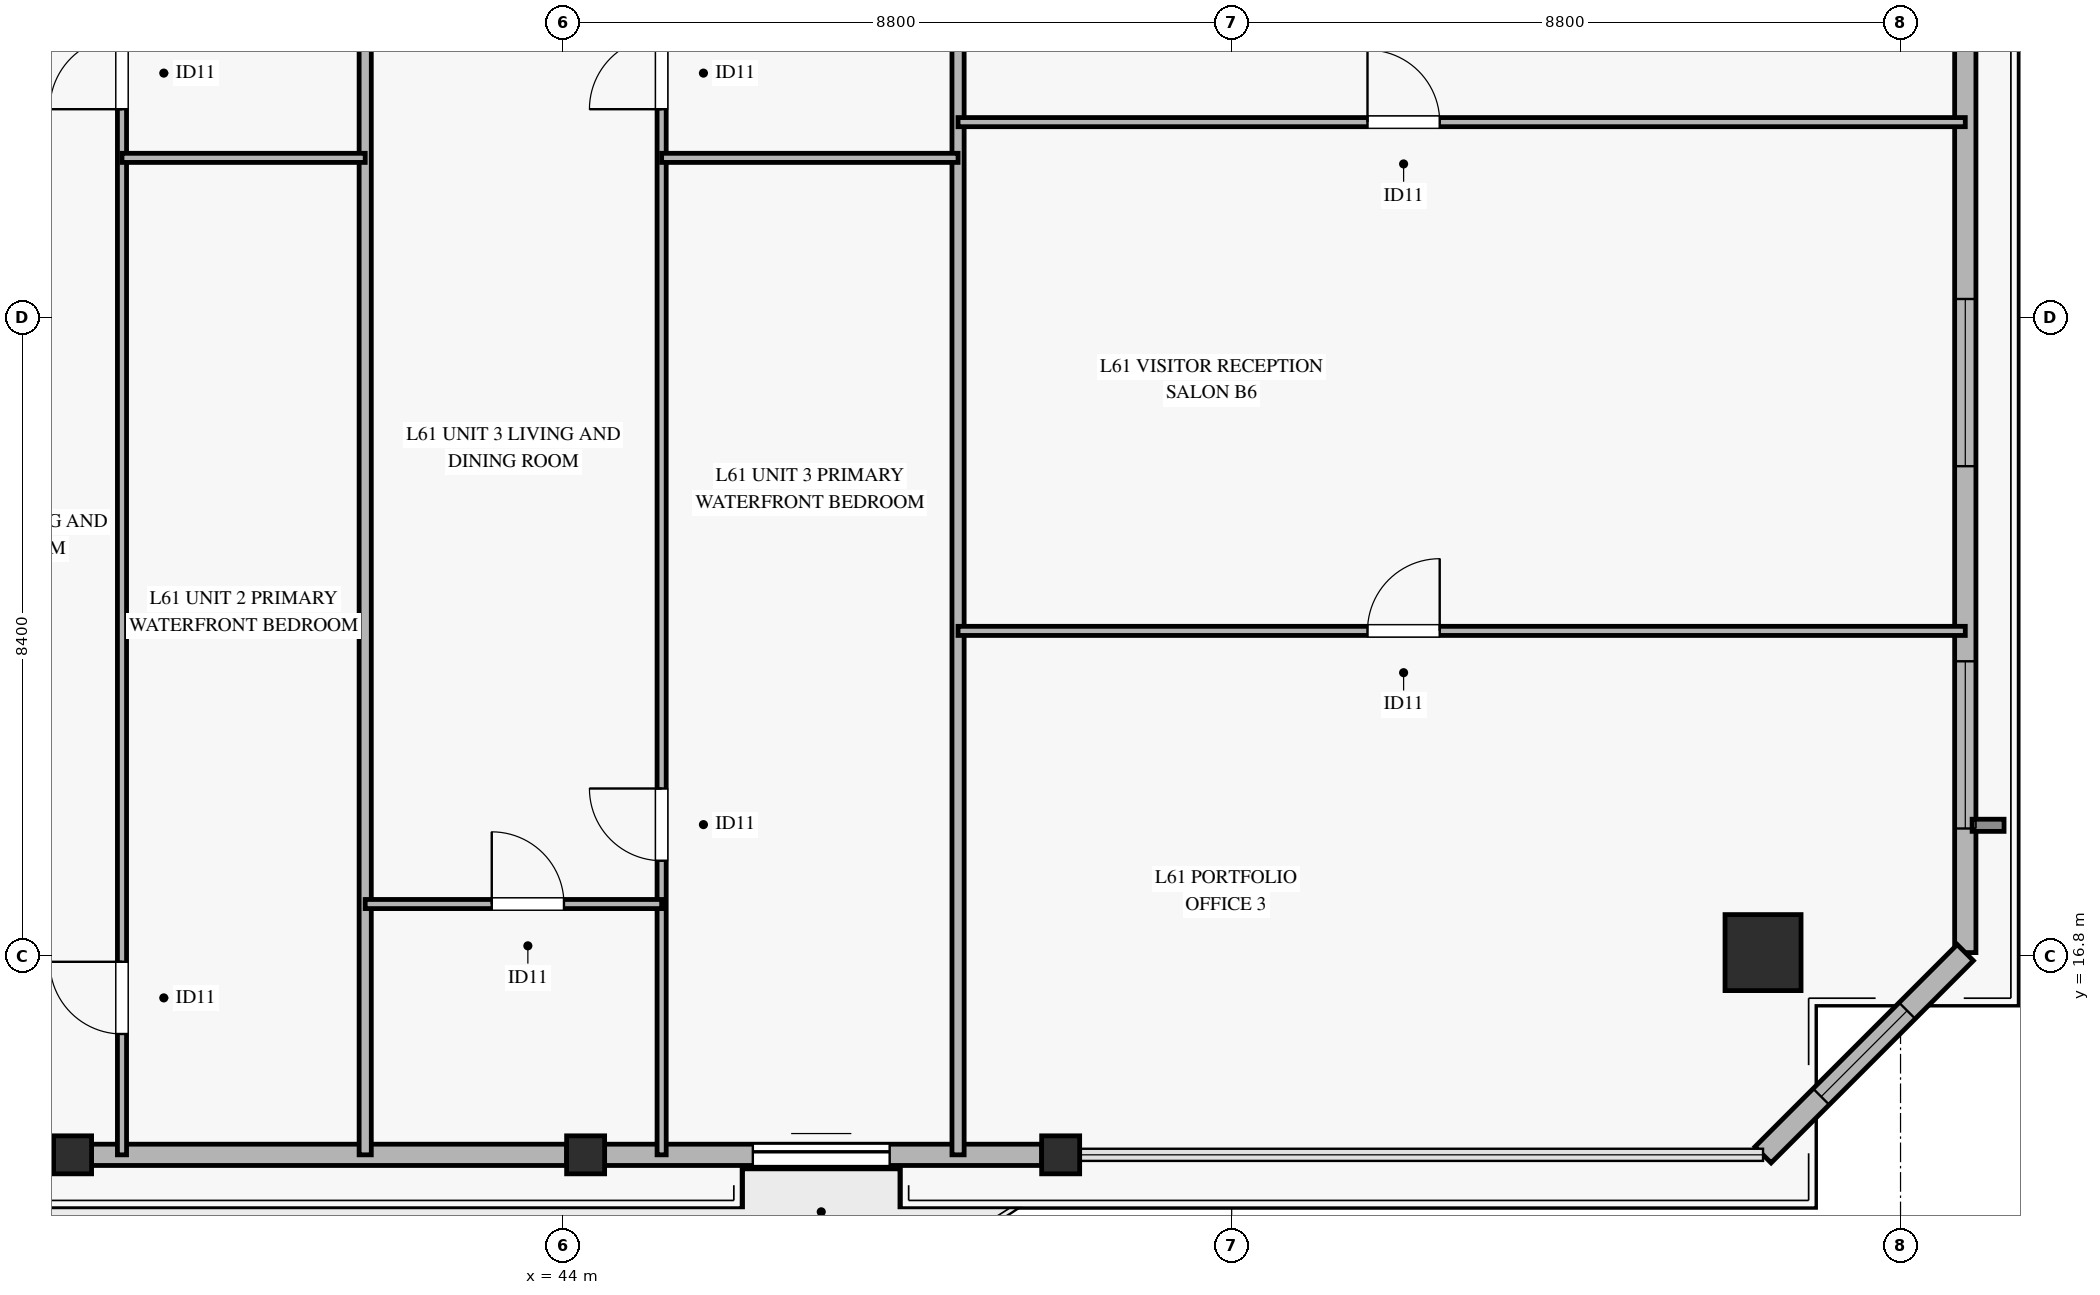
"""IFC4 building model, lengths in metres.
Left out: names, types, materials, properties, quantities, classifications, styles, units other than length and angle.
Written with IfcOpenShell. Run it as: python <this file> out.ifc"""

import sys

from ifc_helpers import new_model, si_unit, direction, frame, frame_2d, origin, origin_2d, place, context, subcontext, project, spatial, rectangle, hollow_rectangle, extrude, source, transform, mapped, element, fill, save


model = new_model("IFC4")
c1 = context("Model", 3, precision=1e-05, world=origin(), true_north=direction((0.0, 1.0)))
c2 = subcontext(c1, "Body", "Model", "MODEL_VIEW")
j1 = project(units=[si_unit("LENGTHUNIT", "METRE"), si_unit("PLANEANGLEUNIT", "RADIAN")], contexts=[c1])
p1 = place(None, origin())
s1 = spatial("IfcSite", under=j1, at=p1, CompositionType="ELEMENT")
p2 = place(p1, origin())
s2 = spatial("IfcBuilding", under=s1, at=p2, CompositionType="ELEMENT")
p3 = place(p2, frame((0.0, 0.0, 241.7)))
s3 = spatial("IfcBuildingStorey", under=s2, at=p3, CompositionType="ELEMENT", Elevation=241.7)
m1 = source(origin(), c2, "Body", "SweptSolid", [
    extrude(hollow_rectangle(XDim=1.0, YDim=1.0, WallThickness=0.045, at=origin_2d()), origin(), (0.0, 0.0, 1.0), 3.185),
])
p4 = place(p3, frame((59.791, 16.843, 0.0), z_axis=(0.0, 0.0, 1.0), x_axis=(1.0, 0.0, 0.0)))
e1 = element("IfcColumn", 1, at=p4, inside=s3, PredefinedType="COLUMN", context=c2, shape_type="MappedRepresentation", body=[
    mapped(m1, transform((0.0, 0.0, 0.0), x_axis=(1.0, 0.0, 0.0), y_axis=(0.0, 1.0, 0.0), z_axis=(0.0, 0.0, 1.0), scale=1.0)),
])
m2 = source(origin(), c2, "Body", "SweptSolid", [
    extrude(hollow_rectangle(XDim=0.5, YDim=0.5, WallThickness=0.024, at=origin_2d()), origin(), (0.0, 0.0, 1.0), 3.185),
])
for number, where, z_axis, x_axis in (
    (2, (37.55, 14.182, 0.0), (0.0, 0.0, 1.0), (1.0, 0.0, 0.0)),
    (3, (44.3, 14.182, 0.0), (0.0, 0.0, 1.0), (1.0, 0.0, 0.0)),
    (4, (50.55, 14.182, 0.0), (0.0, 0.0, 1.0), (1.0, 0.0, 0.0)),
):
    element("IfcColumn", number, at=place(p3, frame(where, z_axis=z_axis, x_axis=x_axis)), inside=s3, PredefinedType="COLUMN", context=c2, shape_type="MappedRepresentation", body=[
        mapped(m2, transform((0.0, 0.0, 0.0), x_axis=(1.0, 0.0, 0.0), y_axis=(0.0, 1.0, 0.0), z_axis=(0.0, 0.0, 1.0), scale=1.0)),
    ])
for number, where, z_axis, x_axis in (
    (5, (31.05, 14.182, 0.0), (0.0, 0.0, 1.0), (1.0, 0.0, 0.0)),
    (6, (37.8, 14.182, 0.0), (0.0, 0.0, 1.0), (1.0, 0.0, 0.0)),
):
    element("IfcWall", number, at=place(p3, frame(where, z_axis=z_axis, x_axis=x_axis)), inside=s3, PredefinedType="SOLIDWALL", context=c2, shape_type="SweptSolid", body=[
        extrude(rectangle(XDim=6.25, YDim=0.28, at=frame_2d((3.125, 0.0))), origin(), (0.0, 0.0, 1.0), 2.815),
    ])
p5 = place(p3, frame((44.55, 14.182, 0.0), z_axis=(0.0, 0.0, 1.0), x_axis=(1.0, 0.0, 0.0)))
e7 = element("IfcWall", 7, at=p5, inside=s3, PredefinedType="SOLIDWALL", context=c2, shape_type="SweptSolid", body=[
    extrude(rectangle(XDim=5.75, YDim=0.28, at=frame_2d((2.875, 0.0))), origin(), (0.0, 0.0, 1.0), 2.815),
])
p6 = place(p5, frame((1.95, 0.0, 0.0)))
e8 = element("IfcOpeningElement", 8, at=p6, cuts=e7, PredefinedType="OPENING", context=c2, shape_type="SweptSolid", body=[
    extrude(rectangle(XDim=1.8, YDim=2.25, at=frame_2d((0.9, 1.125))), frame((0.0, 0.15, 0.0), z_axis=(0.0, -1.0, 0.0), x_axis=(1.0, 0.0, 0.0)), (0.0, 0.0, 1.0), 0.3),
])
p7 = place(p3, frame((62.452, 16.843, 0.0), z_axis=(0.0, 0.0, 1.0), x_axis=(0.0, 1.0, 0.0)))
e9 = element("IfcWall", 9, at=p7, inside=s3, PredefinedType="SOLIDWALL", context=c2, shape_type="SweptSolid", body=[
    extrude(rectangle(XDim=13.048, YDim=0.28, at=frame_2d((6.524, 0.0))), origin(), (0.0, 0.0, 1.0), 2.815),
])
p8 = place(p7, frame((1.633, 0.0, 0.45)))
e10 = element("IfcOpeningElement", 10, at=p8, cuts=e9, PredefinedType="OPENING", context=c2, shape_type="SweptSolid", body=[
    extrude(rectangle(XDim=2.2, YDim=2.1, at=frame_2d((1.1, 1.05))), frame((0.0, 0.15, 0.0), z_axis=(0.0, -1.0, 0.0), x_axis=(1.0, 0.0, 0.0)), (0.0, 0.0, 1.0), 0.3),
])
p9 = place(p7, frame((6.4, 0.0, 0.45)))
e11 = element("IfcOpeningElement", 11, at=p9, cuts=e9, PredefinedType="OPENING", context=c2, shape_type="SweptSolid", body=[
    extrude(rectangle(XDim=2.2, YDim=2.1, at=frame_2d((1.1, 1.05))), frame((0.0, 0.15, 0.0), z_axis=(0.0, -1.0, 0.0), x_axis=(1.0, 0.0, 0.0)), (0.0, 0.0, 1.0), 0.3),
])
p10 = place(p3, frame((59.791, 14.182, 0.0), z_axis=(0.0, 0.0, 1.0), x_axis=(0.707074342864, 0.707139218021, 0.0)))
e12 = element("IfcWall", 12, at=p10, inside=s3, PredefinedType="SOLIDWALL", context=c2, shape_type="SweptSolid", body=[
    extrude(rectangle(XDim=3.763, YDim=0.3, at=frame_2d((1.882, 0.0))), origin(), (0.0, 0.0, 1.0), 2.815),
])
p11 = place(p10, frame((1.082, 0.0, 0.45)))
e13 = element("IfcOpeningElement", 13, at=p11, cuts=e12, PredefinedType="OPENING", context=c2, shape_type="SweptSolid", body=[
    extrude(rectangle(XDim=1.6, YDim=2.0, at=frame_2d((0.8, 1.0))), frame((0.0, 0.16, 0.0), z_axis=(0.0, -1.0, 0.0), x_axis=(1.0, 0.0, 0.0)), (0.0, 0.0, 1.0), 0.32),
])
for number, where, z_axis, x_axis in (
    (14, (41.4, 14.182, 0.0), (0.0, 0.0, 1.0), (0.0, 1.0, 0.0)),
    (15, (49.2, 14.182, 0.0), (0.0, 0.0, 1.0), (0.0, 1.0, 0.0)),
):
    element("IfcWall", number, at=place(p3, frame(where, z_axis=z_axis, x_axis=x_axis)), inside=s3, PredefinedType="PARTITIONING", context=c2, shape_type="SweptSolid", body=[
        extrude(rectangle(XDim=19.968, YDim=0.16, at=frame_2d((9.984, 0.0))), origin(), (0.0, 0.0, 1.0), 2.77),
    ])
p12 = place(p3, frame((38.2, 14.182, 0.0), z_axis=(0.0, 0.0, 1.0), x_axis=(0.0, 1.0, 0.0)))
e16 = element("IfcWall", 16, at=p12, inside=s3, PredefinedType="PARTITIONING", context=c2, shape_type="SweptSolid", body=[
    extrude(rectangle(XDim=17.318, YDim=0.12, at=frame_2d((8.659, 0.0))), origin(), (0.0, 0.0, 1.0), 2.77),
])
p13 = place(p12, frame((1.59, 0.0, 0.0)))
e17 = element("IfcOpeningElement", 17, at=p13, cuts=e16, PredefinedType="OPENING", context=c2, shape_type="SweptSolid", body=[
    extrude(rectangle(XDim=0.95, YDim=2.1, at=frame_2d((0.475, 1.05))), frame((0.0, 0.07, 0.0), z_axis=(0.0, -1.0, 0.0), x_axis=(1.0, 0.0, 0.0)), (0.0, 0.0, 1.0), 0.14),
])
p14 = place(p12, frame((13.758, 0.0, 0.0)))
e18 = element("IfcOpeningElement", 18, at=p14, cuts=e16, PredefinedType="OPENING", context=c2, shape_type="SweptSolid", body=[
    extrude(rectangle(XDim=0.95, YDim=2.1, at=frame_2d((0.475, 1.05))), frame((0.0, 0.07, 0.0), z_axis=(0.0, -1.0, 0.0), x_axis=(1.0, 0.0, 0.0)), (0.0, 0.0, 1.0), 0.14),
])
p15 = place(p3, frame((38.2, 27.3, 0.0), z_axis=(0.0, 0.0, 1.0), x_axis=(1.0, 0.0, 0.0)))
e19 = element("IfcWall", 19, at=p15, inside=s3, PredefinedType="PARTITIONING", context=c2, shape_type="SweptSolid", body=[
    extrude(rectangle(XDim=3.2, YDim=0.12, at=frame_2d((1.6, 0.0))), origin(), (0.0, 0.0, 1.0), 3.185),
])
p16 = place(p3, frame((45.3, 14.182, 0.0), z_axis=(0.0, 0.0, 1.0), x_axis=(0.0, 1.0, 0.0)))
e20 = element("IfcWall", 20, at=p16, inside=s3, PredefinedType="PARTITIONING", context=c2, shape_type="SweptSolid", body=[
    extrude(rectangle(XDim=17.318, YDim=0.12, at=frame_2d((8.659, 0.0))), origin(), (0.0, 0.0, 1.0), 2.77),
])
p17 = place(p16, frame((3.87, 0.0, 0.0)))
e21 = element("IfcOpeningElement", 21, at=p17, cuts=e20, PredefinedType="OPENING", context=c2, shape_type="SweptSolid", body=[
    extrude(rectangle(XDim=0.95, YDim=2.1, at=frame_2d((0.475, 1.05))), frame((0.0, 0.07, 0.0), z_axis=(0.0, -1.0, 0.0), x_axis=(1.0, 0.0, 0.0)), (0.0, 0.0, 1.0), 0.14),
])
p18 = place(p16, frame((13.758, 0.0, 0.0)))
e22 = element("IfcOpeningElement", 22, at=p18, cuts=e20, PredefinedType="OPENING", context=c2, shape_type="SweptSolid", body=[
    extrude(rectangle(XDim=0.95, YDim=2.1, at=frame_2d((0.475, 1.05))), frame((0.0, 0.07, 0.0), z_axis=(0.0, -1.0, 0.0), x_axis=(1.0, 0.0, 0.0)), (0.0, 0.0, 1.0), 0.14),
])
p19 = place(p3, frame((41.4, 17.482, 0.0), z_axis=(0.0, 0.0, 1.0), x_axis=(1.0, 0.0, 0.0)))
e23 = element("IfcWall", 23, at=p19, inside=s3, PredefinedType="PARTITIONING", context=c2, shape_type="SweptSolid", body=[
    extrude(rectangle(XDim=3.9, YDim=0.12, at=frame_2d((1.95, 0.0))), origin(), (0.0, 0.0, 1.0), 2.47),
])
p20 = place(p19, frame((1.665, 0.0, 0.0)))
e24 = element("IfcOpeningElement", 24, at=p20, cuts=e23, PredefinedType="OPENING", context=c2, shape_type="SweptSolid", body=[
    extrude(rectangle(XDim=0.95, YDim=2.1, at=frame_2d((0.475, 1.05))), frame((0.0, 0.07, 0.0), z_axis=(0.0, -1.0, 0.0), x_axis=(1.0, 0.0, 0.0)), (0.0, 0.0, 1.0), 0.14),
])
p21 = place(p3, frame((45.3, 27.3, 0.0), z_axis=(0.0, 0.0, 1.0), x_axis=(1.0, 0.0, 0.0)))
e25 = element("IfcWall", 25, at=p21, inside=s3, PredefinedType="PARTITIONING", context=c2, shape_type="SweptSolid", body=[
    extrude(rectangle(XDim=3.9, YDim=0.12, at=frame_2d((1.95, 0.0))), origin(), (0.0, 0.0, 1.0), 3.185),
])
p22 = place(p3, frame((49.2, 21.076, 0.0), z_axis=(0.0, 0.0, 1.0), x_axis=(1.0, 0.0, 0.0)))
e26 = element("IfcWall", 26, at=p22, inside=s3, PredefinedType="PARTITIONING", context=c2, shape_type="SweptSolid", body=[
    extrude(rectangle(XDim=13.252, YDim=0.12, at=frame_2d((6.626, 0.0))), origin(), (0.0, 0.0, 1.0), 2.47),
])
p23 = place(p22, frame((5.387, 0.0, 0.0)))
e27 = element("IfcOpeningElement", 27, at=p23, cuts=e26, PredefinedType="OPENING", context=c2, shape_type="SweptSolid", body=[
    extrude(rectangle(XDim=0.95, YDim=2.1, at=frame_2d((0.475, 1.05))), frame((0.0, 0.07, 0.0), z_axis=(0.0, -1.0, 0.0), x_axis=(1.0, 0.0, 0.0)), (0.0, 0.0, 1.0), 0.14),
])
p24 = place(p3, frame((49.2, 27.77, 0.0), z_axis=(0.0, 0.0, 1.0), x_axis=(1.0, 0.0, 0.0)))
e28 = element("IfcWall", 28, at=p24, inside=s3, PredefinedType="PARTITIONING", context=c2, shape_type="SweptSolid", body=[
    extrude(rectangle(XDim=13.252, YDim=0.12, at=frame_2d((6.626, 0.0))), origin(), (0.0, 0.0, 1.0), 2.47),
])
p25 = place(p24, frame((5.387, 0.0, 0.0)))
e29 = element("IfcOpeningElement", 29, at=p25, cuts=e28, PredefinedType="OPENING", context=c2, shape_type="SweptSolid", body=[
    extrude(rectangle(XDim=0.95, YDim=2.1, at=frame_2d((0.475, 1.05))), frame((0.0, 0.07, 0.0), z_axis=(0.0, -1.0, 0.0), x_axis=(1.0, 0.0, 0.0)), (0.0, 0.0, 1.0), 0.14),
])
m3 = source(origin(), c2, "Body", "SweptSolid", [
    extrude(rectangle(XDim=1.8, YDim=2.25, at=frame_2d((0.9, 1.125))), frame((0.0, 0.025, 0.0), z_axis=(0.0, -1.0, 0.0), x_axis=(1.0, 0.0, 0.0)), (0.0, 0.0, 1.0), 0.05),
])
p26 = place(p6, origin())
e30 = element("IfcDoor", 30, at=p26, inside=s3, OperationType="SLIDING_TO_LEFT", PredefinedType="DOOR", context=c2, shape_type="MappedRepresentation", body=[
    mapped(m3, transform((0.0, 0.0, 0.0), x_axis=(1.0, 0.0, 0.0), y_axis=(0.0, 1.0, 0.0), z_axis=(0.0, 0.0, 1.0), scale=1.0)),
])
fill(e8, e30)
m4 = source(origin(), c2, "Body", "SweptSolid", [
    extrude(rectangle(XDim=2.2, YDim=2.1, at=frame_2d((1.1, 1.05))), frame((0.0, 0.03, 0.0), z_axis=(0.0, -1.0, 0.0), x_axis=(1.0, 0.0, 0.0)), (0.0, 0.0, 1.0), 0.06),
])
p27 = place(p8, origin())
e31 = element("IfcWindow", 31, at=p27, inside=s3, PartitioningType="SINGLE_PANEL", PredefinedType="WINDOW", context=c2, shape_type="MappedRepresentation", body=[
    mapped(m4, transform((0.0, 0.0, 0.0), x_axis=(1.0, 0.0, 0.0), y_axis=(0.0, 1.0, 0.0), z_axis=(0.0, 0.0, 1.0), scale=1.0)),
])
fill(e10, e31)
p28 = place(p9, origin())
e32 = element("IfcWindow", 32, at=p28, inside=s3, PartitioningType="SINGLE_PANEL", PredefinedType="WINDOW", context=c2, shape_type="MappedRepresentation", body=[
    mapped(m4, transform((0.0, 0.0, 0.0), x_axis=(1.0, 0.0, 0.0), y_axis=(0.0, 1.0, 0.0), z_axis=(0.0, 0.0, 1.0), scale=1.0)),
])
fill(e11, e32)
m5 = source(origin(), c2, "Body", "SweptSolid", [
    extrude(rectangle(XDim=1.6, YDim=2.0, at=frame_2d((0.8, 1.0))), frame((0.0, 0.03, 0.0), z_axis=(0.0, -1.0, 0.0), x_axis=(1.0, 0.0, 0.0)), (0.0, 0.0, 1.0), 0.06),
])
p29 = place(p11, origin())
e33 = element("IfcWindow", 33, at=p29, inside=s3, PartitioningType="SINGLE_PANEL", PredefinedType="WINDOW", context=c2, shape_type="MappedRepresentation", body=[
    mapped(m5, transform((0.0, 0.0, 0.0), x_axis=(1.0, 0.0, 0.0), y_axis=(0.0, 1.0, 0.0), z_axis=(0.0, 0.0, 1.0), scale=1.0)),
])
fill(e13, e33)
m6 = source(origin(), c2, "Body", "SweptSolid", [
    extrude(rectangle(XDim=0.95, YDim=2.1, at=frame_2d((0.475, 1.05))), frame((0.0, 0.025, 0.0), z_axis=(0.0, -1.0, 0.0), x_axis=(1.0, 0.0, 0.0)), (0.0, 0.0, 1.0), 0.05),
])
p30 = place(p13, origin())
e34 = element("IfcDoor", 34, at=p30, inside=s3, OperationType="SINGLE_SWING_RIGHT", PredefinedType="DOOR", context=c2, shape_type="MappedRepresentation", body=[
    mapped(m6, transform((0.0, 0.0, 0.0), x_axis=(1.0, 0.0, 0.0), y_axis=(0.0, 1.0, 0.0), z_axis=(0.0, 0.0, 1.0), scale=1.0)),
])
fill(e17, e34)
p31 = place(p14, origin())
e35 = element("IfcDoor", 35, at=p31, inside=s3, OperationType="SINGLE_SWING_LEFT", PredefinedType="DOOR", context=c2, shape_type="MappedRepresentation", body=[
    mapped(m6, transform((0.0, 0.0, 0.0), x_axis=(1.0, 0.0, 0.0), y_axis=(0.0, 1.0, 0.0), z_axis=(0.0, 0.0, 1.0), scale=1.0)),
])
fill(e18, e35)
p32 = place(p20, origin())
e36 = element("IfcDoor", 36, at=p32, inside=s3, OperationType="SINGLE_SWING_LEFT", PredefinedType="DOOR", context=c2, shape_type="MappedRepresentation", body=[
    mapped(m6, transform((0.0, 0.0, 0.0), x_axis=(1.0, 0.0, 0.0), y_axis=(0.0, 1.0, 0.0), z_axis=(0.0, 0.0, 1.0), scale=1.0)),
])
fill(e24, e36)
p33 = place(p17, origin())
e37 = element("IfcDoor", 37, at=p33, inside=s3, OperationType="SINGLE_SWING_RIGHT", PredefinedType="DOOR", context=c2, shape_type="MappedRepresentation", body=[
    mapped(m6, transform((0.0, 0.0, 0.0), x_axis=(1.0, 0.0, 0.0), y_axis=(0.0, 1.0, 0.0), z_axis=(0.0, 0.0, 1.0), scale=1.0)),
])
fill(e21, e37)
p34 = place(p18, origin())
e38 = element("IfcDoor", 38, at=p34, inside=s3, OperationType="SINGLE_SWING_LEFT", PredefinedType="DOOR", context=c2, shape_type="MappedRepresentation", body=[
    mapped(m6, transform((0.0, 0.0, 0.0), x_axis=(1.0, 0.0, 0.0), y_axis=(0.0, 1.0, 0.0), z_axis=(0.0, 0.0, 1.0), scale=1.0)),
])
fill(e22, e38)
p35 = place(p25, origin())
e39 = element("IfcDoor", 39, at=p35, inside=s3, OperationType="SINGLE_SWING_LEFT", PredefinedType="DOOR", context=c2, shape_type="MappedRepresentation", body=[
    mapped(m6, transform((0.0, 0.0, 0.0), x_axis=(1.0, 0.0, 0.0), y_axis=(0.0, 1.0, 0.0), z_axis=(0.0, 0.0, 1.0), scale=1.0)),
])
fill(e29, e39)
p36 = place(p23, origin())
e40 = element("IfcDoor", 40, at=p36, inside=s3, OperationType="SINGLE_SWING_RIGHT", PredefinedType="DOOR", context=c2, shape_type="MappedRepresentation", body=[
    mapped(m6, transform((0.0, 0.0, 0.0), x_axis=(1.0, 0.0, 0.0), y_axis=(0.0, 1.0, 0.0), z_axis=(0.0, 0.0, 1.0), scale=1.0)),
])
fill(e27, e40)
save(model, sys.argv[1])
